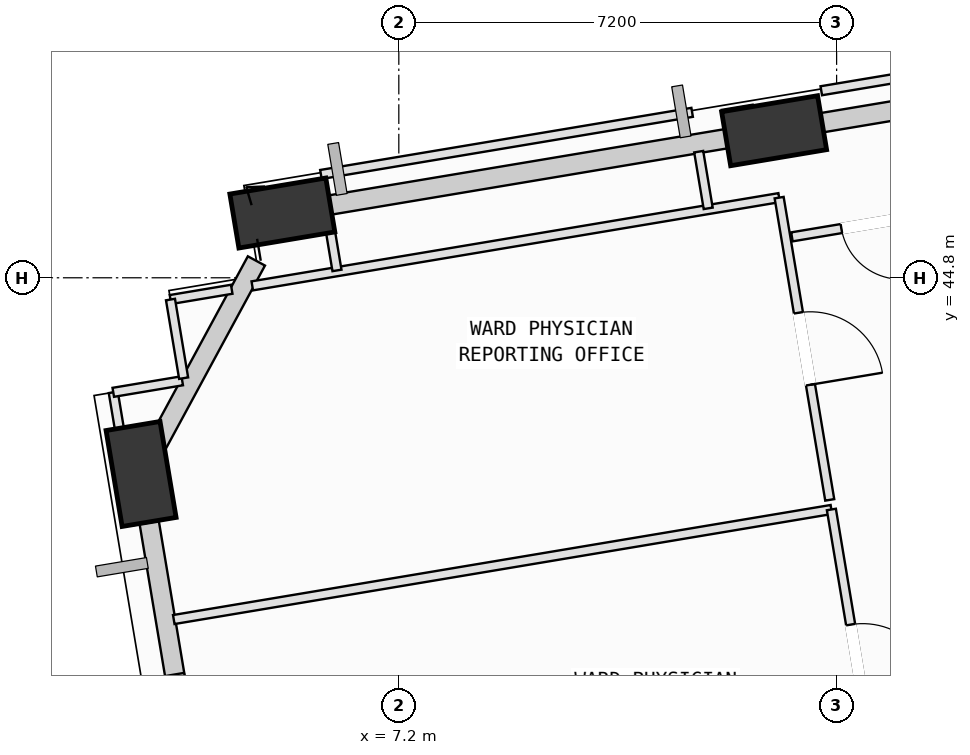
"""IFC4 building model, lengths in metres.
Left out: names, types, materials, properties, quantities, classifications, styles, units other than length and angle.
Written with IfcOpenShell. Run it as: python <this file> out.ifc"""

import sys

from ifc_helpers import new_model, si_unit, direction, frame, frame_2d, origin, origin_2d, place, context, subcontext, project, spatial, rectangle, extrude, element, fill, save


model = new_model("IFC4")
c1 = context("Model", 3, precision=1e-05, world=origin(), true_north=direction((0.0, 1.0)))
c2 = subcontext(c1, "Body", "Model", "MODEL_VIEW")
j1 = project(units=[si_unit("LENGTHUNIT", "METRE"), si_unit("PLANEANGLEUNIT", "RADIAN")], contexts=[c1])
p1 = place(None, origin())
s1 = spatial("IfcSite", under=j1, at=p1, CompositionType="ELEMENT")
p2 = place(p1, origin())
s2 = spatial("IfcBuilding", under=s1, at=p2, CompositionType="ELEMENT")
p3 = place(p2, frame((0.0, 0.0, 63.0)))
s3 = spatial("IfcBuildingStorey", under=s2, at=p3, CompositionType="ELEMENT", Elevation=63.0)
p4 = place(p3, frame((13.372, 47.219, 0.002), z_axis=(-0.091527721681, -0.083950923529, 0.99225748604), x_axis=(0.78736575955, -0.616145251126, 0.020498541485)))
e1 = element("IfcColumn", 1, at=p4, inside=s3, PredefinedType="COLUMN", context=c2, shape_type="SweptSolid", body=[
    extrude(rectangle(XDim=1.6, YDim=0.9, at=origin_2d()), origin(), (0.0, 0.0, 1.0), 4.028),
])
p5 = place(p3, frame((5.285, 45.865, 0.002), z_axis=(-0.085407667791, -0.116838656645, 0.989471706819), x_axis=(0.892609593077, -0.450197220598, 0.023886751839)))
e2 = element("IfcColumn", 2, at=p5, inside=s3, PredefinedType="COLUMN", context=c2, shape_type="SweptSolid", body=[
    extrude(rectangle(XDim=1.6, YDim=0.9, at=origin_2d()), origin(), (0.0, 0.0, 1.0), 4.039),
])
p6 = place(p3, frame((2.961, 41.573, 0.002), z_axis=(-0.06777240471, -0.126234416622, 0.989682662887), x_axis=(0.316301268917, 0.938074881883, 0.141311794492)))
e3 = element("IfcColumn", 3, at=p6, inside=s3, PredefinedType="COLUMN", context=c2, shape_type="SweptSolid", body=[
    extrude(rectangle(XDim=1.6, YDim=0.9, at=origin_2d()), origin(), (0.0, 0.0, 1.0), 4.038),
])
p7 = place(p3, frame((13.75, 47.282, 0.0), z_axis=(0.0, 0.0, 1.0), x_axis=(0.986281570607, 0.165071691945, 0.0)))
e4 = element("IfcWall", 4, at=p7, inside=s3, PredefinedType="SOLIDWALL", context=c2, shape_type="SweptSolid", body=[
    extrude(rectangle(XDim=7.003, YDim=0.32, at=frame_2d((3.501, 0.0))), origin(), (0.0, 0.0, 1.0), 3.165),
])
p8 = place(p3, frame((5.643, 45.926, 0.0), z_axis=(0.0, 0.0, 1.0), x_axis=(0.986289610151, 0.16502364954, 0.0)))
e5 = element("IfcWall", 5, at=p8, inside=s3, PredefinedType="SOLIDWALL", context=c2, shape_type="SweptSolid", body=[
    extrude(rectangle(XDim=7.035, YDim=0.32, at=frame_2d((3.517, 0.0))), origin(), (0.0, 0.0, 1.0), 3.165),
])
p9 = place(p3, frame((3.113, 41.853, 0.0), z_axis=(0.0, 0.0, 1.0), x_axis=(0.476012817588, 0.879438342064, 0.0)))
e6 = element("IfcWall", 6, at=p9, inside=s3, PredefinedType="SOLIDWALL", context=c2, shape_type="SweptSolid", body=[
    extrude(rectangle(XDim=3.666, YDim=0.32, at=frame_2d((1.833, 0.0))), origin(), (0.0, 0.0, 1.0), 3.165),
])
p10 = place(p3, frame((3.957, 35.622, 0.0), z_axis=(0.0, 0.0, 1.0), x_axis=(-0.165050831886, 0.98628506168, 0.0)))
e7 = element("IfcWall", 7, at=p10, inside=s3, PredefinedType="SOLIDWALL", context=c2, shape_type="SweptSolid", body=[
    extrude(rectangle(XDim=5.223, YDim=0.32, at=frame_2d((2.611, 0.0))), origin(), (0.0, 0.0, 1.0), 3.165),
])
p11 = place(p10, frame((0.69, 0.0, 0.75)))
e8 = element("IfcOpeningElement", 8, at=p11, cuts=e7, PredefinedType="OPENING", context=c2, shape_type="SweptSolid", body=[
    extrude(rectangle(XDim=2.0, YDim=1.95, at=frame_2d((1.0, 0.975))), frame((0.0, 0.17, 0.0), z_axis=(0.0, -1.0, 0.0), x_axis=(1.0, 0.0, 0.0)), (0.0, 0.0, 1.0), 0.34),
])
p12 = place(p3, frame((3.499, 39.179, 0.0), z_axis=(0.0, 0.0, 1.0), x_axis=(0.986281769972, 0.165070500758, 0.0)))
e9 = element("IfcWall", 9, at=p12, inside=s3, PredefinedType="PARTITIONING", context=c2, shape_type="SweptSolid", body=[
    extrude(rectangle(XDim=10.965, YDim=0.15, at=frame_2d((5.483, 0.0))), origin(), (0.0, 0.0, 1.0), 3.78),
])
p13 = place(p3, frame((14.314, 40.989, 0.0), z_axis=(0.0, 0.0, 1.0), x_axis=(0.16489385241, -0.986311318721, 0.0)))
e10 = element("IfcWall", 10, at=p13, inside=s3, PredefinedType="PARTITIONING", context=c2, shape_type="SweptSolid", body=[
    extrude(rectangle(XDim=5.04, YDim=0.15, at=frame_2d((2.52, 0.0))), origin(), (0.0, 0.0, 1.0), 3.78),
])
p14 = place(p13, frame((1.92, 0.0, 0.0)))
e11 = element("IfcOpeningElement", 11, at=p14, cuts=e10, PredefinedType="OPENING", context=c2, shape_type="SweptSolid", body=[
    extrude(rectangle(XDim=1.2, YDim=2.15, at=frame_2d((0.6, 1.075))), frame((0.0, 0.085, 0.0), z_axis=(0.0, -1.0, 0.0), x_axis=(1.0, 0.0, 0.0)), (0.0, 0.0, 1.0), 0.17),
])
p15 = place(p3, frame((3.445, 44.442, 0.0), z_axis=(0.0, 0.0, 1.0), x_axis=(0.986173301346, 0.165717288514, 0.0)))
e12 = element("IfcWall", 12, at=p15, inside=s3, PredefinedType="PARTITIONING", context=c2, shape_type="SweptSolid", body=[
    extrude(rectangle(XDim=1.021, YDim=0.15, at=frame_2d((0.51, 0.0))), origin(), (0.0, 0.0, 1.0), 3.78),
])
p16 = place(p3, frame((4.79, 44.667, 0.0), z_axis=(0.0, 0.0, 1.0), x_axis=(0.986268967524, 0.165146976051, 0.0)))
e13 = element("IfcWall", 13, at=p16, inside=s3, PredefinedType="PARTITIONING", context=c2, shape_type="SweptSolid", body=[
    extrude(rectangle(XDim=8.786, YDim=0.15, at=frame_2d((4.393, 0.0))), origin(), (0.0, 0.0, 1.0), 3.78),
])
p17 = place(p3, frame((13.455, 46.118, 0.0), z_axis=(0.0, 0.0, 1.0), x_axis=(0.165082339721, -0.986279788454, 0.0)))
e14 = element("IfcWall", 14, at=p17, inside=s3, PredefinedType="PARTITIONING", context=c2, shape_type="SweptSolid", body=[
    extrude(rectangle(XDim=5.04, YDim=0.15, at=frame_2d((2.52, 0.0))), origin(), (0.0, 0.0, 1.0), 2.865),
])
p18 = place(p17, frame((1.92, 0.0, 0.0)))
e15 = element("IfcOpeningElement", 15, at=p18, cuts=e14, PredefinedType="OPENING", context=c2, shape_type="SweptSolid", body=[
    extrude(rectangle(XDim=1.2, YDim=2.15, at=frame_2d((0.6, 1.075))), frame((0.0, 0.085, 0.0), z_axis=(0.0, -1.0, 0.0), x_axis=(1.0, 0.0, 0.0)), (0.0, 0.0, 1.0), 0.17),
])
p19 = place(p3, frame((2.869, 40.736, 0.0), z_axis=(0.0, 0.0, 1.0), x_axis=(-0.165133332046, 0.986271252064, 0.0)))
e16 = element("IfcWall", 16, at=p19, inside=s3, PredefinedType="PARTITIONING", context=c2, shape_type="SweptSolid", body=[
    extrude(rectangle(XDim=2.21, YDim=0.15, at=frame_2d((1.105, 0.0))), origin(), (0.0, 0.0, 1.0), 3.165),
])
p20 = place(p3, frame((2.504, 42.916, 0.0), z_axis=(0.0, 0.0, 1.0), x_axis=(0.986261618519, 0.165190858818, 0.0)))
e17 = element("IfcWall", 17, at=p20, inside=s3, PredefinedType="PARTITIONING", context=c2, shape_type="SweptSolid", body=[
    extrude(rectangle(XDim=1.15, YDim=0.15, at=frame_2d((0.575, 0.0))), origin(), (0.0, 0.0, 1.0), 3.78),
])
p21 = place(p3, frame((3.661, 43.149, 0.0), z_axis=(0.0, 0.0, 1.0), x_axis=(-0.164640597534, 0.986353625047, 0.0)))
e18 = element("IfcWall", 18, at=p21, inside=s3, PredefinedType="PARTITIONING", context=c2, shape_type="SweptSolid", body=[
    extrude(rectangle(XDim=1.311, YDim=0.15, at=frame_2d((0.655, 0.0))), origin(), (0.0, 0.0, 1.0), 3.78),
])
p22 = place(p3, frame((5.919, 46.499, 0.0), z_axis=(0.0, 0.0, 1.0), x_axis=(0.986276414142, 0.165102498184, 0.0)))
e19 = element("IfcWall", 19, at=p22, inside=s3, PredefinedType="PARTITIONING", context=c2, shape_type="SweptSolid", body=[
    extrude(rectangle(XDim=6.19, YDim=0.15, at=frame_2d((3.095, 0.0))), origin(), (0.0, 0.0, 1.0), 3.78),
])
for number, where, z_axis, x_axis in (
    (20, (12.132, 46.874, 0.0), (0.0, 0.0, 1.0), (0.165, -0.986, 0.0)),
    (21, (6.183, 44.921, 0.0), (0.0, 0.0, 1.0), (-0.165, 0.986, 0.0)),
):
    element("IfcWall", number, at=place(p3, frame(where, z_axis=z_axis, x_axis=x_axis)), inside=s3, PredefinedType="PARTITIONING", context=c2, shape_type="SweptSolid", body=[
        extrude(rectangle(XDim=0.945, YDim=0.15, at=frame_2d((0.473, 0.0))), origin(), (0.0, 0.0, 1.0), 3.78),
    ])
p23 = place(p3, frame((14.148, 47.876, 0.0), z_axis=(0.0, 0.0, 1.0), x_axis=(0.986287401188, 0.165036851214, 0.0)))
e22 = element("IfcWall", 22, at=p23, inside=s3, PredefinedType="PARTITIONING", context=c2, shape_type="SweptSolid", body=[
    extrude(rectangle(XDim=4.096, YDim=0.15, at=frame_2d((2.048, 0.0))), origin(), (0.0, 0.0, 1.0), 3.78),
])
p24 = place(p3, frame((16.278, 45.911, 0.0), z_axis=(0.0, 0.0, 1.0), x_axis=(-0.986241585852, -0.165310418109, 0.0)))
e23 = element("IfcWall", 23, at=p24, inside=s3, PredefinedType="PARTITIONING", context=c2, shape_type="SweptSolid", body=[
    extrude(rectangle(XDim=2.649, YDim=0.15, at=frame_2d((1.325, 0.0))), origin(), (0.0, 0.0, 1.0), 3.78),
])
p25 = place(p24, frame((0.825, 0.0, 0.0)))
e24 = element("IfcOpeningElement", 24, at=p25, cuts=e23, PredefinedType="OPENING", context=c2, shape_type="SweptSolid", body=[
    extrude(rectangle(XDim=1.0, YDim=2.12, at=frame_2d((0.5, 1.06))), frame((0.0, 0.085, 0.0), z_axis=(0.0, -1.0, 0.0), x_axis=(1.0, 0.0, 0.0)), (0.0, 0.0, 1.0), 0.17),
])
p26 = place(p11, origin())
e25 = element("IfcWindow", 25, at=p26, inside=s3, PartitioningType="SINGLE_PANEL", PredefinedType="WINDOW", context=c2, shape_type="SweptSolid", body=[
    extrude(rectangle(XDim=2.0, YDim=1.95, at=frame_2d((1.0, 0.975))), frame((0.0, 0.03, 0.0), z_axis=(0.0, -1.0, 0.0), x_axis=(1.0, 0.0, 0.0)), (0.0, 0.0, 1.0), 0.06),
])
fill(e8, e25)
p27 = place(p14, origin())
e26 = element("IfcDoor", 26, at=p27, inside=s3, OperationType="SINGLE_SWING_RIGHT", PredefinedType="DOOR", context=c2, shape_type="SweptSolid", body=[
    extrude(rectangle(XDim=1.2, YDim=2.15, at=frame_2d((0.6, 1.075))), frame((0.0, 0.025, 0.0), z_axis=(0.0, -1.0, 0.0), x_axis=(1.0, 0.0, 0.0)), (0.0, 0.0, 1.0), 0.05),
])
fill(e11, e26)
p28 = place(p18, origin())
e27 = element("IfcDoor", 27, at=p28, inside=s3, OperationType="SINGLE_SWING_RIGHT", PredefinedType="DOOR", context=c2, shape_type="SweptSolid", body=[
    extrude(rectangle(XDim=1.2, YDim=2.15, at=frame_2d((0.6, 1.075))), frame((0.0, 0.025, 0.0), z_axis=(0.0, -1.0, 0.0), x_axis=(1.0, 0.0, 0.0)), (0.0, 0.0, 1.0), 0.05),
])
fill(e15, e27)
p29 = place(p25, origin())
e28 = element("IfcDoor", 28, at=p29, inside=s3, OperationType="SINGLE_SWING_LEFT", PredefinedType="DOOR", context=c2, shape_type="SweptSolid", body=[
    extrude(rectangle(XDim=1.0, YDim=2.12, at=frame_2d((0.5, 1.06))), frame((0.0, 0.025, 0.0), z_axis=(0.0, -1.0, 0.0), x_axis=(1.0, 0.0, 0.0)), (0.0, 0.0, 1.0), 0.05),
])
fill(e24, e28)
save(model, sys.argv[1])
